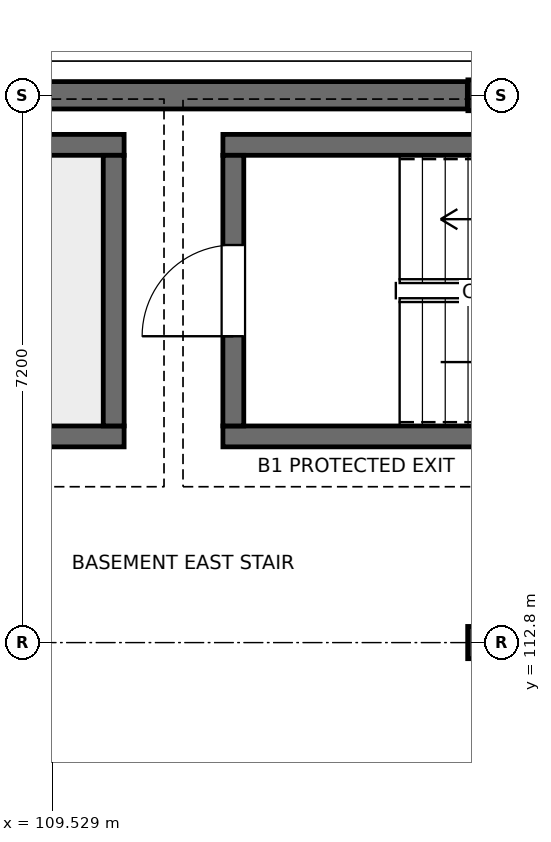
"""IFC4 building model, lengths in metres.
Left out: names, types, materials, properties, quantities, classifications, styles, units other than length and angle.
Written with IfcOpenShell. Run it as: python <this file> out.ifc"""

import sys

from ifc_helpers import new_model, si_unit, direction, frame, frame_2d, origin, origin_2d, place, context, subcontext, project, spatial, rectangle, i_section, extrude, element, fill, save


model = new_model("IFC4")
c1 = context("Model", 3, precision=1e-05, world=origin(), true_north=direction((0.0, 1.0)))
c2 = subcontext(c1, "Body", "Model", "MODEL_VIEW")
j1 = project(units=[si_unit("LENGTHUNIT", "METRE"), si_unit("PLANEANGLEUNIT", "RADIAN")], contexts=[c1])
p1 = place(None, origin())
s1 = spatial("IfcSite", under=j1, at=p1, CompositionType="ELEMENT")
p2 = place(p1, origin())
s2 = spatial("IfcBuilding", under=s1, at=p2, CompositionType="ELEMENT")
p3 = place(p2, frame((0.0, 0.0, -4.5)))
s3 = spatial("IfcBuildingStorey", under=s2, at=p3, CompositionType="ELEMENT", Elevation=-4.5)
p4 = place(p3, frame((115.2, 112.8, 0.0), z_axis=(0.0, 0.0, 1.0), x_axis=(1.0, 0.0, 0.0)))
e1 = element("IfcColumn", 1, at=p4, inside=s3, PredefinedType="COLUMN", context=c2, shape_type="SweptSolid", body=[
    extrude(i_section(OverallWidth=0.409, OverallDepth=0.424, WebThickness=0.033, FlangeThickness=0.052, FilletRadius=0.015, at=origin_2d()), origin(), (0.0, 0.0, 1.0), 4.5),
])
p5 = place(p3, frame((115.2, 120.0, 0.0), z_axis=(0.0, 0.0, 1.0), x_axis=(1.0, 0.0, 0.0)))
e2 = element("IfcColumn", 2, at=p5, inside=s3, PredefinedType="COLUMN", context=c2, shape_type="SweptSolid", body=[
    extrude(i_section(OverallWidth=0.404, OverallDepth=0.406, WebThickness=0.027, FlangeThickness=0.044, FilletRadius=0.015, at=origin_2d()), origin(), (0.0, 0.0, 1.0), 4.5),
])
p6 = place(p3, frame((108.209, 120.0, 0.0), z_axis=(0.0, 0.0, 1.0), x_axis=(1.0, 0.0, 0.0)))
e3 = element("IfcWall", 3, at=p6, inside=s3, PredefinedType="SOLIDWALL", context=c2, shape_type="SweptSolid", body=[
    extrude(rectangle(XDim=6.782, YDim=0.36, at=frame_2d((3.391, 0.0))), origin(), (0.0, 0.0, 1.0), 3.448),
])
for number, where, z_axis, x_axis in (
    (4, (110.475, 115.512, 0.0), (0.0, 0.0, 1.0), (-1.0, 0.0, 0.0)),
    (5, (101.575, 119.348, 0.0), (0.0, 0.0, 1.0), (1.0, 0.0, 0.0)),
):
    element("IfcWall", number, at=place(p3, frame(where, z_axis=z_axis, x_axis=x_axis)), inside=s3, PredefinedType="SOLIDWALL", context=c2, shape_type="SweptSolid", body=[
        extrude(rectangle(XDim=8.9, YDim=0.275, at=frame_2d((4.45, 0.0))), origin(), (0.0, 0.0, 1.0), 4.22),
    ])
p7 = place(p3, frame((110.338, 119.21, 0.0), z_axis=(0.0, 0.0, 1.0), x_axis=(0.0, -1.0, 0.0)))
e6 = element("IfcWall", 6, at=p7, inside=s3, PredefinedType="SOLIDWALL", context=c2, shape_type="SweptSolid", body=[
    extrude(rectangle(XDim=3.56, YDim=0.275, at=frame_2d((1.78, 0.0))), origin(), (0.0, 0.0, 1.0), 4.22),
])
for number, where, z_axis, x_axis in (
    (7, (120.725, 115.512, 0.0), (0.0, 0.0, 1.0), (-1.0, 0.0, 0.0)),
    (8, (111.775, 119.348, 0.0), (0.0, 0.0, 1.0), (1.0, 0.0, 0.0)),
):
    element("IfcWall", number, at=place(p3, frame(where, z_axis=z_axis, x_axis=x_axis)), inside=s3, PredefinedType="SOLIDWALL", context=c2, shape_type="SweptSolid", body=[
        extrude(rectangle(XDim=8.95, YDim=0.275, at=frame_2d((4.475, 0.0))), origin(), (0.0, 0.0, 1.0), 4.22),
    ])
p8 = place(p3, frame((111.912, 115.65, 0.0), z_axis=(0.0, 0.0, 1.0), x_axis=(0.0, 1.0, 0.0)))
e9 = element("IfcWall", 9, at=p8, inside=s3, PredefinedType="SOLIDWALL", context=c2, shape_type="SweptSolid", body=[
    extrude(rectangle(XDim=3.56, YDim=0.275, at=frame_2d((1.78, 0.0))), origin(), (0.0, 0.0, 1.0), 4.22),
])
p9 = place(p8, frame((1.18, 0.0, 0.0)))
e10 = element("IfcOpeningElement", 10, at=p9, cuts=e9, PredefinedType="OPENING", context=c2, shape_type="SweptSolid", body=[
    extrude(rectangle(XDim=1.2, YDim=2.2, at=frame_2d((0.6, 1.1))), frame((0.0, 0.147, 0.0), z_axis=(0.0, -1.0, 0.0), x_axis=(1.0, 0.0, 0.0)), (0.0, 0.0, 1.0), 0.295),
])
p10 = place(p9, origin())
e11 = element("IfcDoor", 11, at=p10, inside=s3, OperationType="SINGLE_SWING_LEFT", PredefinedType="DOOR", context=c2, shape_type="SweptSolid", body=[
    extrude(rectangle(XDim=1.2, YDim=2.2, at=frame_2d((0.6, 1.1))), frame((0.0, 0.025, 0.0), z_axis=(0.0, -1.0, 0.0), x_axis=(1.0, 0.0, 0.0)), (0.0, 0.0, 1.0), 0.05),
])
fill(e10, e11)
save(model, sys.argv[1])
